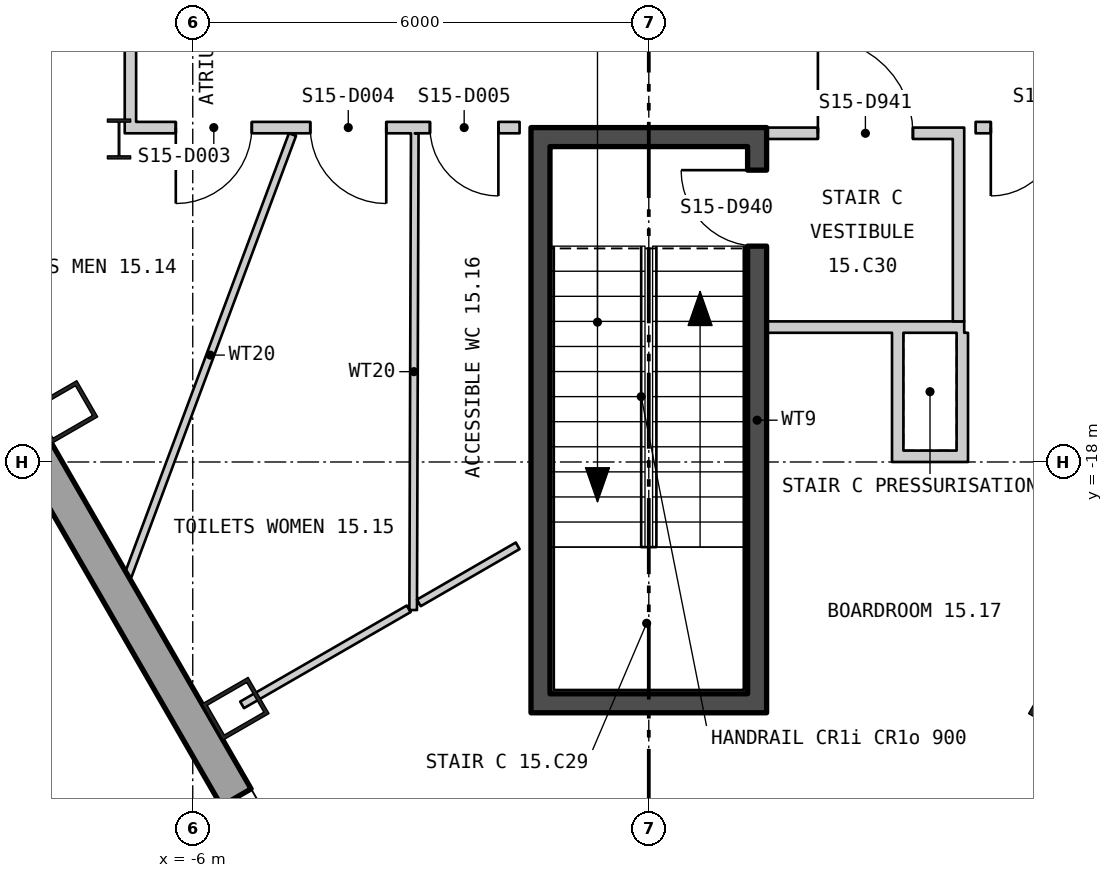
"""IFC4 building model, lengths in metres.
Left out: names, types, materials, properties, quantities, classifications, styles, units other than length and angle.
Written with IfcOpenShell. Run it as: python <this file> out.ifc"""

import sys

from ifc_helpers import new_model, si_unit, direction, frame, frame_2d, origin, origin_2d, place, context, subcontext, project, spatial, polyline, rectangle, hollow_rectangle, i_section, outline, extrude, element, fill, save


model = new_model("IFC4")
c1 = context("Model", 3, precision=1e-05, world=origin(), true_north=direction((0.0, 1.0)))
c2 = subcontext(c1, "Body", "Model", "MODEL_VIEW")
j1 = project(units=[si_unit("LENGTHUNIT", "METRE"), si_unit("PLANEANGLEUNIT", "RADIAN")], contexts=[c1])
p1 = place(None, origin())
s1 = spatial("IfcSite", under=j1, at=p1, CompositionType="ELEMENT")
p2 = place(p1, origin())
s2 = spatial("IfcBuilding", under=s1, at=p2, CompositionType="ELEMENT")
p3 = place(p2, frame((0.0, 0.0, 204.3)))
s3 = spatial("IfcBuildingStorey", under=s2, at=p3, CompositionType="ELEMENT", Elevation=204.3)
for number, where, z_axis, x_axis in (
    (1, (-7.691, -17.343, 0.0), (0.0, 0.0, 1.0), (0.5, -0.866, 0.0)),
    (2, (-5.437, -21.247, 0.0), (0.0, 0.0, 1.0), (0.5, -0.866, 0.0)),
    (3, (5.437, -21.247, 0.0), (0.0, 0.0, 1.0), (0.5, 0.866, 0.0)),
):
    element("IfcColumn", number, at=place(p3, frame(where, z_axis=z_axis, x_axis=x_axis)), inside=s3, PredefinedType="COLUMN", context=c2, shape_type="SweptSolid", body=[
        extrude(hollow_rectangle(XDim=0.55, YDim=0.7, WallThickness=0.05, at=origin_2d()), origin(), (0.0, 0.0, 1.0), 3.9),
    ])
p4 = place(p3, frame((-6.97, -13.75, 0.0), z_axis=(0.0, 0.0, 1.0), x_axis=(1.0, 0.0, 0.0)))
e4 = element("IfcColumn", 4, at=p4, inside=s3, PredefinedType="COLUMN", context=c2, shape_type="SweptSolid", body=[
    extrude(i_section(OverallWidth=0.306, OverallDepth=0.524, WebThickness=0.021, FlangeThickness=0.04, at=origin_2d()), origin(), (0.0, 0.0, 1.0), 3.9),
])
p5 = place(p3, frame((-26.385, 13.887, -0.18), z_axis=(0.0, 0.0, 1.0), x_axis=(0.499999764979, -0.866025539474, 0.0)))
e5 = element("IfcWall", 5, at=p5, inside=s3, PredefinedType="SOLIDWALL", context=c2, shape_type="SweptSolid", body=[
    extrude(outline(polyline([(-0.13, -0.225), (45.87, -0.225), (45.61, 0.225), (0.13, 0.225), (-0.13, -0.225)])), origin(), (0.0, 0.0, 1.0), 3.68),
])
p6 = place(p5, frame((1.424, 0.0, 1.08)))
e6 = element("IfcOpeningElement", 6, at=p6, cuts=e5, PredefinedType="OPENING", context=c2, shape_type="SweptSolid", body=[
    extrude(rectangle(XDim=2.4, YDim=2.0, at=frame_2d((1.2, 1.0))), frame((0.0, 0.235, 0.0), z_axis=(0.0, -1.0, 0.0), x_axis=(1.0, 0.0, 0.0)), (0.0, 0.0, 1.0), 0.47),
])
p7 = place(p5, frame((5.893, 0.0, 1.08)))
e7 = element("IfcOpeningElement", 7, at=p7, cuts=e5, PredefinedType="OPENING", context=c2, shape_type="SweptSolid", body=[
    extrude(rectangle(XDim=2.4, YDim=2.0, at=frame_2d((1.2, 1.0))), frame((0.0, 0.235, 0.0), z_axis=(0.0, -1.0, 0.0), x_axis=(1.0, 0.0, 0.0)), (0.0, 0.0, 1.0), 0.47),
])
p8 = place(p5, frame((10.401, 0.0, 1.08)))
e8 = element("IfcOpeningElement", 8, at=p8, cuts=e5, PredefinedType="OPENING", context=c2, shape_type="SweptSolid", body=[
    extrude(rectangle(XDim=2.4, YDim=2.0, at=frame_2d((1.2, 1.0))), frame((0.0, 0.235, 0.0), z_axis=(0.0, -1.0, 0.0), x_axis=(1.0, 0.0, 0.0)), (0.0, 0.0, 1.0), 0.47),
])
p9 = place(p5, frame((14.909, 0.0, 1.08)))
e9 = element("IfcOpeningElement", 9, at=p9, cuts=e5, PredefinedType="OPENING", context=c2, shape_type="SweptSolid", body=[
    extrude(rectangle(XDim=2.4, YDim=2.0, at=frame_2d((1.2, 1.0))), frame((0.0, 0.235, 0.0), z_axis=(0.0, -1.0, 0.0), x_axis=(1.0, 0.0, 0.0)), (0.0, 0.0, 1.0), 0.47),
])
p10 = place(p5, frame((19.416, 0.0, 1.08)))
e10 = element("IfcOpeningElement", 10, at=p10, cuts=e5, PredefinedType="OPENING", context=c2, shape_type="SweptSolid", body=[
    extrude(rectangle(XDim=2.4, YDim=2.0, at=frame_2d((1.2, 1.0))), frame((0.0, 0.235, 0.0), z_axis=(0.0, -1.0, 0.0), x_axis=(1.0, 0.0, 0.0)), (0.0, 0.0, 1.0), 0.47),
])
p11 = place(p5, frame((23.924, 0.0, 1.08)))
e11 = element("IfcOpeningElement", 11, at=p11, cuts=e5, PredefinedType="OPENING", context=c2, shape_type="SweptSolid", body=[
    extrude(rectangle(XDim=2.4, YDim=2.0, at=frame_2d((1.2, 1.0))), frame((0.0, 0.235, 0.0), z_axis=(0.0, -1.0, 0.0), x_axis=(1.0, 0.0, 0.0)), (0.0, 0.0, 1.0), 0.47),
])
p12 = place(p5, frame((28.431, 0.0, 1.08)))
e12 = element("IfcOpeningElement", 12, at=p12, cuts=e5, PredefinedType="OPENING", context=c2, shape_type="SweptSolid", body=[
    extrude(rectangle(XDim=2.4, YDim=2.0, at=frame_2d((1.2, 1.0))), frame((0.0, 0.235, 0.0), z_axis=(0.0, -1.0, 0.0), x_axis=(1.0, 0.0, 0.0)), (0.0, 0.0, 1.0), 0.47),
])
p13 = place(p5, frame((32.939, 0.0, 1.08)))
e13 = element("IfcOpeningElement", 13, at=p13, cuts=e5, PredefinedType="OPENING", context=c2, shape_type="SweptSolid", body=[
    extrude(rectangle(XDim=2.4, YDim=2.0, at=frame_2d((1.2, 1.0))), frame((0.0, 0.235, 0.0), z_axis=(0.0, -1.0, 0.0), x_axis=(1.0, 0.0, 0.0)), (0.0, 0.0, 1.0), 0.47),
])
p14 = place(p5, frame((41.916, 0.0, 1.08)))
e14 = element("IfcOpeningElement", 14, at=p14, cuts=e5, PredefinedType="OPENING", context=c2, shape_type="SweptSolid", body=[
    extrude(rectangle(XDim=2.4, YDim=2.0, at=frame_2d((1.2, 1.0))), frame((0.0, 0.235, 0.0), z_axis=(0.0, -1.0, 0.0), x_axis=(1.0, 0.0, 0.0)), (0.0, 0.0, 1.0), 0.47),
])
p15 = place(p3, frame((3.515, -25.726, -0.18), z_axis=(0.0, 0.0, 1.0), x_axis=(0.499999764979, 0.866025539474, 0.0)))
e15 = element("IfcWall", 15, at=p15, inside=s3, PredefinedType="SOLIDWALL", context=c2, shape_type="SweptSolid", body=[
    extrude(outline(polyline([(-0.13, -0.225), (45.87, -0.225), (45.61, 0.225), (0.13, 0.225), (-0.13, -0.225)])), origin(), (0.0, 0.0, 1.0), 3.68),
])
p16 = place(p15, frame((1.424, 0.0, 1.08)))
e16 = element("IfcOpeningElement", 16, at=p16, cuts=e15, PredefinedType="OPENING", context=c2, shape_type="SweptSolid", body=[
    extrude(rectangle(XDim=2.4, YDim=2.0, at=frame_2d((1.2, 1.0))), frame((0.0, 0.235, 0.0), z_axis=(0.0, -1.0, 0.0), x_axis=(1.0, 0.0, 0.0)), (0.0, 0.0, 1.0), 0.47),
])
p17 = place(p15, frame((5.893, 0.0, 1.08)))
e17 = element("IfcOpeningElement", 17, at=p17, cuts=e15, PredefinedType="OPENING", context=c2, shape_type="SweptSolid", body=[
    extrude(rectangle(XDim=2.4, YDim=2.0, at=frame_2d((1.2, 1.0))), frame((0.0, 0.235, 0.0), z_axis=(0.0, -1.0, 0.0), x_axis=(1.0, 0.0, 0.0)), (0.0, 0.0, 1.0), 0.47),
])
p18 = place(p15, frame((10.401, 0.0, 1.08)))
e18 = element("IfcOpeningElement", 18, at=p18, cuts=e15, PredefinedType="OPENING", context=c2, shape_type="SweptSolid", body=[
    extrude(rectangle(XDim=2.4, YDim=2.0, at=frame_2d((1.2, 1.0))), frame((0.0, 0.235, 0.0), z_axis=(0.0, -1.0, 0.0), x_axis=(1.0, 0.0, 0.0)), (0.0, 0.0, 1.0), 0.47),
])
p19 = place(p15, frame((14.909, 0.0, 1.08)))
e19 = element("IfcOpeningElement", 19, at=p19, cuts=e15, PredefinedType="OPENING", context=c2, shape_type="SweptSolid", body=[
    extrude(rectangle(XDim=2.4, YDim=2.0, at=frame_2d((1.2, 1.0))), frame((0.0, 0.235, 0.0), z_axis=(0.0, -1.0, 0.0), x_axis=(1.0, 0.0, 0.0)), (0.0, 0.0, 1.0), 0.47),
])
p20 = place(p15, frame((19.416, 0.0, 1.08)))
e20 = element("IfcOpeningElement", 20, at=p20, cuts=e15, PredefinedType="OPENING", context=c2, shape_type="SweptSolid", body=[
    extrude(rectangle(XDim=2.4, YDim=2.0, at=frame_2d((1.2, 1.0))), frame((0.0, 0.235, 0.0), z_axis=(0.0, -1.0, 0.0), x_axis=(1.0, 0.0, 0.0)), (0.0, 0.0, 1.0), 0.47),
])
p21 = place(p15, frame((23.924, 0.0, 1.08)))
e21 = element("IfcOpeningElement", 21, at=p21, cuts=e15, PredefinedType="OPENING", context=c2, shape_type="SweptSolid", body=[
    extrude(rectangle(XDim=2.4, YDim=2.0, at=frame_2d((1.2, 1.0))), frame((0.0, 0.235, 0.0), z_axis=(0.0, -1.0, 0.0), x_axis=(1.0, 0.0, 0.0)), (0.0, 0.0, 1.0), 0.47),
])
p22 = place(p15, frame((28.431, 0.0, 1.08)))
e22 = element("IfcOpeningElement", 22, at=p22, cuts=e15, PredefinedType="OPENING", context=c2, shape_type="SweptSolid", body=[
    extrude(rectangle(XDim=2.4, YDim=2.0, at=frame_2d((1.2, 1.0))), frame((0.0, 0.235, 0.0), z_axis=(0.0, -1.0, 0.0), x_axis=(1.0, 0.0, 0.0)), (0.0, 0.0, 1.0), 0.47),
])
p23 = place(p15, frame((32.939, 0.0, 1.08)))
e23 = element("IfcOpeningElement", 23, at=p23, cuts=e15, PredefinedType="OPENING", context=c2, shape_type="SweptSolid", body=[
    extrude(rectangle(XDim=2.4, YDim=2.0, at=frame_2d((1.2, 1.0))), frame((0.0, 0.235, 0.0), z_axis=(0.0, -1.0, 0.0), x_axis=(1.0, 0.0, 0.0)), (0.0, 0.0, 1.0), 0.47),
])
p24 = place(p15, frame((37.447, 0.0, 1.08)))
e24 = element("IfcOpeningElement", 24, at=p24, cuts=e15, PredefinedType="OPENING", context=c2, shape_type="SweptSolid", body=[
    extrude(rectangle(XDim=2.4, YDim=2.0, at=frame_2d((1.2, 1.0))), frame((0.0, 0.235, 0.0), z_axis=(0.0, -1.0, 0.0), x_axis=(1.0, 0.0, 0.0)), (0.0, 0.0, 1.0), 0.47),
])
p25 = place(p15, frame((41.916, 0.0, 1.08)))
e25 = element("IfcOpeningElement", 25, at=p25, cuts=e15, PredefinedType="OPENING", context=c2, shape_type="SweptSolid", body=[
    extrude(rectangle(XDim=2.4, YDim=2.0, at=frame_2d((1.2, 1.0))), frame((0.0, 0.235, 0.0), z_axis=(0.0, -1.0, 0.0), x_axis=(1.0, 0.0, 0.0)), (0.0, 0.0, 1.0), 0.47),
])
p26 = place(p3, frame((-1.425, -21.05, 0.0), z_axis=(0.0, 0.0, 1.0), x_axis=(0.0, 1.0, 0.0)))
e26 = element("IfcWall", 26, at=p26, inside=s3, PredefinedType="SHEAR", context=c2, shape_type="SweptSolid", body=[
    extrude(rectangle(XDim=7.2, YDim=0.25, at=frame_2d((3.6, 0.0))), origin(), (0.0, 0.0, 1.0), 3.7),
])
p27 = place(p3, frame((1.425, -21.05, 0.0), z_axis=(0.0, 0.0, 1.0), x_axis=(0.0, 1.0, 0.0)))
e27 = element("IfcWall", 27, at=p27, inside=s3, PredefinedType="SHEAR", context=c2, shape_type="SweptSolid", body=[
    extrude(rectangle(XDim=7.2, YDim=0.25, at=frame_2d((3.6, 0.0))), origin(), (0.0, 0.0, 1.0), 3.7),
])
p28 = place(p27, frame((5.89, 0.0, 0.0)))
e28 = element("IfcOpeningElement", 28, at=p28, cuts=e27, PredefinedType="OPENING", context=c2, shape_type="SweptSolid", body=[
    extrude(rectangle(XDim=1.0, YDim=2.1, at=frame_2d((0.5, 1.05))), frame((0.0, 0.135, 0.0), z_axis=(0.0, -1.0, 0.0), x_axis=(1.0, 0.0, 0.0)), (0.0, 0.0, 1.0), 0.27),
])
for number, where, z_axis, x_axis in (
    (29, (-1.55, -21.175, 0.0), (0.0, 0.0, 1.0), (1.0, 0.0, 0.0)),
    (30, (-1.55, -13.725, 0.0), (0.0, 0.0, 1.0), (1.0, 0.0, 0.0)),
):
    element("IfcWall", number, at=place(p3, frame(where, z_axis=z_axis, x_axis=x_axis)), inside=s3, PredefinedType="SHEAR", context=c2, shape_type="SweptSolid", body=[
        extrude(rectangle(XDim=3.1, YDim=0.25, at=frame_2d((1.55, 0.0))), origin(), (0.0, 0.0, 1.0), 3.7),
    ])
p29 = place(p3, frame((1.55, -16.225, 0.0), z_axis=(0.0, 0.0, 1.0), x_axis=(1.0, 0.0, 0.0)))
e31 = element("IfcWall", 31, at=p29, inside=s3, PredefinedType="PARTITIONING", context=c2, shape_type="SweptSolid", body=[
    extrude(rectangle(XDim=2.6, YDim=0.15, at=frame_2d((1.3, 0.0))), origin(), (0.0, 0.0, 1.0), 3.7),
])
p30 = place(p3, frame((4.075, -16.15, 0.0), z_axis=(0.0, 0.0, 1.0), x_axis=(0.0, 1.0, 0.0)))
e32 = element("IfcWall", 32, at=p30, inside=s3, PredefinedType="PARTITIONING", context=c2, shape_type="SweptSolid", body=[
    extrude(rectangle(XDim=2.4, YDim=0.15, at=frame_2d((1.2, 0.0))), origin(), (0.0, 0.0, 1.0), 3.7),
])
p31 = place(p3, frame((1.55, -13.675, 0.0), z_axis=(0.0, 0.0, 1.0), x_axis=(1.0, 0.0, 0.0)))
e33 = element("IfcWall", 33, at=p31, inside=s3, PredefinedType="PARTITIONING", context=c2, shape_type="SweptSolid", body=[
    extrude(rectangle(XDim=2.6, YDim=0.15, at=frame_2d((1.3, 0.0))), origin(), (0.0, 0.0, 1.0), 2.91),
])
p32 = place(p31, frame((0.675, 0.0, 0.0)))
e34 = element("IfcOpeningElement", 34, at=p32, cuts=e33, PredefinedType="OPENING", context=c2, shape_type="SweptSolid", body=[
    extrude(rectangle(XDim=1.25, YDim=2.1, at=frame_2d((0.625, 1.05))), frame((0.0, 0.085, 0.0), z_axis=(0.0, -1.0, 0.0), x_axis=(1.0, 0.0, 0.0)), (0.0, 0.0, 1.0), 0.17),
])
p33 = place(p3, frame((3.275, -18.0, 0.0), z_axis=(0.0, 0.0, 1.0), x_axis=(0.0, 1.0, 0.0)))
e35 = element("IfcWall", 35, at=p33, inside=s3, PredefinedType="PARTITIONING", context=c2, shape_type="SweptSolid", body=[
    extrude(rectangle(XDim=1.7, YDim=0.15, at=frame_2d((0.85, 0.0))), origin(), (0.0, 0.0, 1.0), 3.01),
])
p34 = place(p3, frame((3.35, -17.925, 0.0), z_axis=(0.0, 0.0, 1.0), x_axis=(1.0, 0.0, 0.0)))
e36 = element("IfcWall", 36, at=p34, inside=s3, PredefinedType="PARTITIONING", context=c2, shape_type="SweptSolid", body=[
    extrude(rectangle(XDim=0.7, YDim=0.15, at=frame_2d((0.35, 0.0))), origin(), (0.0, 0.0, 1.0), 3.7),
])
p35 = place(p3, frame((4.125, -18.0, 0.0), z_axis=(0.0, 0.0, 1.0), x_axis=(0.0, 1.0, 0.0)))
e37 = element("IfcWall", 37, at=p35, inside=s3, PredefinedType="PARTITIONING", context=c2, shape_type="SweptSolid", body=[
    extrude(rectangle(XDim=1.7, YDim=0.15, at=frame_2d((0.85, 0.0))), origin(), (0.0, 0.0, 1.0), 3.7),
])
p36 = place(p3, frame((-9.858, -13.389, 0.0), z_axis=(0.0, 0.0, 1.0), x_axis=(0.865993292597, 0.500055614084, 0.0)))
e38 = element("IfcWall", 38, at=p36, inside=s3, PredefinedType="PARTITIONING", context=c2, shape_type="SweptSolid", body=[
    extrude(rectangle(XDim=3.378, YDim=0.15, at=frame_2d((1.689, 0.0))), origin(), (0.0, 0.0, 1.0), 3.7),
])
p37 = place(p3, frame((-6.852, -19.495, 0.0), z_axis=(0.0, 0.0, 1.0), x_axis=(0.349406475185, 0.936971245609, 0.0)))
e39 = element("IfcWall", 39, at=p37, inside=s3, PredefinedType="PARTITIONING", context=c2, shape_type="SweptSolid", body=[
    extrude(rectangle(XDim=6.193, YDim=0.1, at=frame_2d((3.097, 0.0))), origin(), (0.0, 0.0, 1.0), 3.7),
])
p38 = place(p3, frame((-6.82, -13.675, 0.0), z_axis=(0.0, 0.0, 1.0), x_axis=(0.0, 1.0, 0.0)))
e40 = element("IfcWall", 40, at=p38, inside=s3, PredefinedType="PARTITIONING", context=c2, shape_type="SweptSolid", body=[
    extrude(rectangle(XDim=10.263, YDim=0.15, at=frame_2d((5.131, 0.0))), origin(), (0.0, 0.0, 1.0), 3.11),
])
p39 = place(p3, frame((-6.745, -13.6, 0.0), z_axis=(0.0, 0.0, 1.0), x_axis=(1.0, 0.0, 0.0)))
e41 = element("IfcWall", 41, at=p39, inside=s3, PredefinedType="PARTITIONING", context=c2, shape_type="SweptSolid", body=[
    extrude(rectangle(XDim=5.045, YDim=0.15, at=frame_2d((2.522, 0.0))), origin(), (0.0, 0.0, 1.0), 2.91),
])
p40 = place(p39, frame((0.522, 0.0, 0.0)))
e42 = element("IfcOpeningElement", 42, at=p40, cuts=e41, PredefinedType="OPENING", context=c2, shape_type="SweptSolid", body=[
    extrude(rectangle(XDim=1.0, YDim=2.1, at=frame_2d((0.5, 1.05))), frame((0.0, 0.085, 0.0), z_axis=(0.0, -1.0, 0.0), x_axis=(1.0, 0.0, 0.0)), (0.0, 0.0, 1.0), 0.17),
])
p41 = place(p39, frame((2.291, 0.0, 0.0)))
e43 = element("IfcOpeningElement", 43, at=p41, cuts=e41, PredefinedType="OPENING", context=c2, shape_type="SweptSolid", body=[
    extrude(rectangle(XDim=1.0, YDim=2.1, at=frame_2d((0.5, 1.05))), frame((0.0, 0.085, 0.0), z_axis=(0.0, -1.0, 0.0), x_axis=(1.0, 0.0, 0.0)), (0.0, 0.0, 1.0), 0.17),
])
p42 = place(p39, frame((3.866, 0.0, 0.0)))
e44 = element("IfcOpeningElement", 44, at=p42, cuts=e41, PredefinedType="OPENING", context=c2, shape_type="SweptSolid", body=[
    extrude(rectangle(XDim=0.9, YDim=2.1, at=frame_2d((0.45, 1.05))), frame((0.0, 0.085, 0.0), z_axis=(0.0, -1.0, 0.0), x_axis=(1.0, 0.0, 0.0)), (0.0, 0.0, 1.0), 0.17),
])
p43 = place(p3, frame((-5.351, -21.196, 0.0), z_axis=(0.0, 0.0, 1.0), x_axis=(0.866290838041, 0.499539972301, 0.0)))
e45 = element("IfcWall", 45, at=p43, inside=s3, PredefinedType="PARTITIONING", context=c2, shape_type="SweptSolid", body=[
    extrude(rectangle(XDim=2.53, YDim=0.1, at=frame_2d((1.265, 0.0))), origin(), (0.0, 0.0, 1.0), 3.7),
])
p44 = place(p3, frame((-3.1, -19.948, 0.0), z_axis=(0.0, 0.0, 1.0), x_axis=(0.003347661777, 0.999994396565, 0.0)))
e46 = element("IfcWall", 46, at=p44, inside=s3, PredefinedType="PARTITIONING", context=c2, shape_type="SweptSolid", body=[
    extrude(rectangle(XDim=6.273, YDim=0.1, at=frame_2d((3.136, 0.0))), origin(), (0.0, 0.0, 1.0), 3.01),
])
p45 = place(p3, frame((-3.025, -19.854, 0.0), z_axis=(0.0, 0.0, 1.0), x_axis=(0.865897129857, 0.500222111171, 0.0)))
e47 = element("IfcWall", 47, at=p45, inside=s3, PredefinedType="PARTITIONING", context=c2, shape_type="SweptSolid", body=[
    extrude(rectangle(XDim=1.501, YDim=0.1, at=frame_2d((0.751, 0.0))), origin(), (0.0, 0.0, 1.0), 3.7),
])
p46 = place(p3, frame((4.3, -13.6, 0.0), z_axis=(0.0, 0.0, 1.0), x_axis=(1.0, 0.0, 0.0)))
e48 = element("IfcWall", 48, at=p46, inside=s3, PredefinedType="PARTITIONING", context=c2, shape_type="SweptSolid", body=[
    extrude(rectangle(XDim=2.595, YDim=0.15, at=frame_2d((1.298, 0.0))), origin(), (0.0, 0.0, 1.0), 2.91),
])
p47 = place(p46, frame((0.2, 0.0, 0.0)))
e49 = element("IfcOpeningElement", 49, at=p47, cuts=e48, PredefinedType="OPENING", context=c2, shape_type="SweptSolid", body=[
    extrude(rectangle(XDim=1.8, YDim=2.1, at=frame_2d((0.9, 1.05))), frame((0.0, 0.085, 0.0), z_axis=(0.0, -1.0, 0.0), x_axis=(1.0, 0.0, 0.0)), (0.0, 0.0, 1.0), 0.17),
])
p48 = place(p14, origin())
e50 = element("IfcWindow", 50, at=p48, inside=s3, PartitioningType="SINGLE_PANEL", PredefinedType="WINDOW", context=c2, shape_type="SweptSolid", body=[
    extrude(rectangle(XDim=2.4, YDim=2.0, at=frame_2d((1.2, 1.0))), frame((0.0, 0.105, 0.0), z_axis=(0.0, -1.0, 0.0), x_axis=(1.0, 0.0, 0.0)), (0.0, 0.0, 1.0), 0.06),
])
fill(e14, e50)
p49 = place(p16, origin())
e51 = element("IfcWindow", 51, at=p49, inside=s3, PartitioningType="SINGLE_PANEL", PredefinedType="WINDOW", context=c2, shape_type="SweptSolid", body=[
    extrude(rectangle(XDim=2.4, YDim=2.0, at=frame_2d((1.2, 1.0))), frame((0.0, 0.105, 0.0), z_axis=(0.0, -1.0, 0.0), x_axis=(1.0, 0.0, 0.0)), (0.0, 0.0, 1.0), 0.06),
])
fill(e16, e51)
p50 = place(p28, origin())
e52 = element("IfcDoor", 52, at=p50, inside=s3, OperationType="SINGLE_SWING_LEFT", PredefinedType="DOOR", context=c2, shape_type="SweptSolid", body=[
    extrude(rectangle(XDim=1.0, YDim=2.1, at=frame_2d((0.5, 1.05))), frame((0.0, 0.025, 0.0), z_axis=(0.0, -1.0, 0.0), x_axis=(1.0, 0.0, 0.0)), (0.0, 0.0, 1.0), 0.05),
])
fill(e28, e52)
p51 = place(p32, origin())
e53 = element("IfcDoor", 53, at=p51, inside=s3, OperationType="SINGLE_SWING_RIGHT", PredefinedType="DOOR", context=c2, shape_type="SweptSolid", body=[
    extrude(rectangle(XDim=1.25, YDim=2.1, at=frame_2d((0.625, 1.05))), frame((0.0, 0.025, 0.0), z_axis=(0.0, -1.0, 0.0), x_axis=(1.0, 0.0, 0.0)), (0.0, 0.0, 1.0), 0.05),
])
fill(e34, e53)
p52 = place(p40, origin())
e54 = element("IfcDoor", 54, at=p52, inside=s3, OperationType="SINGLE_SWING_LEFT", PredefinedType="DOOR", context=c2, shape_type="SweptSolid", body=[
    extrude(rectangle(XDim=1.0, YDim=2.1, at=frame_2d((0.5, 1.05))), frame((0.0, 0.025, 0.0), z_axis=(0.0, -1.0, 0.0), x_axis=(1.0, 0.0, 0.0)), (0.0, 0.0, 1.0), 0.05),
])
fill(e42, e54)
p53 = place(p41, origin())
e55 = element("IfcDoor", 55, at=p53, inside=s3, OperationType="SINGLE_SWING_RIGHT", PredefinedType="DOOR", context=c2, shape_type="SweptSolid", body=[
    extrude(rectangle(XDim=1.0, YDim=2.1, at=frame_2d((0.5, 1.05))), frame((0.0, 0.025, 0.0), z_axis=(0.0, -1.0, 0.0), x_axis=(1.0, 0.0, 0.0)), (0.0, 0.0, 1.0), 0.05),
])
fill(e43, e55)
p54 = place(p42, origin())
e56 = element("IfcDoor", 56, at=p54, inside=s3, OperationType="SINGLE_SWING_RIGHT", PredefinedType="DOOR", context=c2, shape_type="SweptSolid", body=[
    extrude(rectangle(XDim=0.9, YDim=2.1, at=frame_2d((0.45, 1.05))), frame((0.0, 0.025, 0.0), z_axis=(0.0, -1.0, 0.0), x_axis=(1.0, 0.0, 0.0)), (0.0, 0.0, 1.0), 0.05),
])
fill(e44, e56)
p55 = place(p47, origin())
e57 = element("IfcDoor", 57, at=p55, inside=s3, OperationType="DOUBLE_DOOR_SINGLE_SWING", PredefinedType="DOOR", context=c2, shape_type="SweptSolid", body=[
    extrude(rectangle(XDim=1.8, YDim=2.1, at=frame_2d((0.9, 1.05))), frame((0.0, 0.025, 0.0), z_axis=(0.0, -1.0, 0.0), x_axis=(1.0, 0.0, 0.0)), (0.0, 0.0, 1.0), 0.05),
])
fill(e49, e57)
save(model, sys.argv[1])
